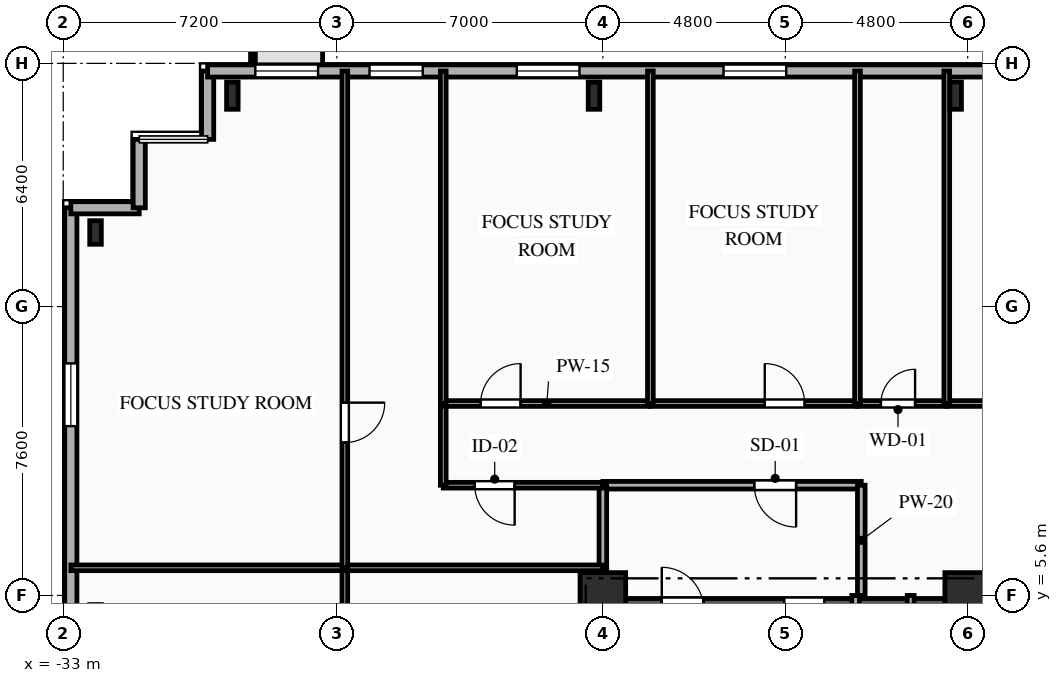
"""IFC4 building model, lengths in metres.
Left out: names, types, materials, properties, quantities, classifications, styles, units other than length and angle.
Written with IfcOpenShell. Run it as: python <this file> out.ifc"""

import sys

from ifc_helpers import new_model, si_unit, direction, frame, frame_2d, origin, origin_2d, place, context, subcontext, project, spatial, rectangle, i_section, extrude, element, fill, save


model = new_model("IFC4")
c1 = context("Model", 3, precision=1e-05, world=origin(), true_north=direction((0.0, 1.0)))
c2 = subcontext(c1, "Body", "Model", "MODEL_VIEW")
j1 = project(units=[si_unit("LENGTHUNIT", "METRE"), si_unit("PLANEANGLEUNIT", "RADIAN")], contexts=[c1])
p1 = place(None, origin())
s1 = spatial("IfcSite", under=j1, at=p1, CompositionType="ELEMENT")
p2 = place(p1, origin())
s2 = spatial("IfcBuilding", under=s1, at=p2, CompositionType="ELEMENT")
p3 = place(p2, frame((0.0, 0.0, 70.55)))
s3 = spatial("IfcBuildingStorey", under=s2, at=p3, CompositionType="ELEMENT", Elevation=70.55)
for number, where, z_axis, x_axis in (
    (1, (-18.8, 5.6, 0.0), (0.0, 0.0, 1.0), (1.0, 0.0, 0.0)),
    (2, (-9.2, 5.6, 0.0), (0.0, 0.0, 1.0), (1.0, 0.0, 0.0)),
):
    element("IfcColumn", number, at=place(p3, frame(where, z_axis=z_axis, x_axis=x_axis)), inside=s3, PredefinedType="COLUMN", context=c2, shape_type="SweptSolid", body=[
        extrude(rectangle(XDim=1.2, YDim=1.2, at=origin_2d()), origin(), (0.0, 0.0, 1.0), 3.35),
    ])
for number, where, z_axis, x_axis in (
    (3, (-9.517, 18.75, 0.0), (0.0, 0.0, 1.0), (1.0, 0.0, 0.0)),
    (4, (-19.033, 18.75, 0.0), (0.0, 0.0, 1.0), (1.0, 0.0, 0.0)),
    (5, (-28.55, 18.75, 0.0), (0.0, 0.0, 1.0), (1.0, 0.0, 0.0)),
):
    element("IfcColumn", number, at=place(p3, frame(where, z_axis=z_axis, x_axis=x_axis)), inside=s3, PredefinedType="COLUMN", context=c2, shape_type="SweptSolid", body=[
        extrude(i_section(OverallWidth=0.304, OverallDepth=0.716, WebThickness=0.021, FlangeThickness=0.04, FilletRadius=0.027, at=origin_2d()), origin(), (0.0, 0.0, 1.0), 3.35),
    ])
p4 = place(p3, frame((-32.15, 15.15, 0.0), z_axis=(0.0, 0.0, 1.0), x_axis=(1.0, 0.0, 0.0)))
e6 = element("IfcColumn", 6, at=p4, inside=s3, PredefinedType="COLUMN", context=c2, shape_type="SweptSolid", body=[
    extrude(i_section(OverallWidth=0.305, OverallDepth=0.62, WebThickness=0.021, FlangeThickness=0.04, FilletRadius=0.027, at=origin_2d()), origin(), (0.0, 0.0, 1.0), 3.35),
])
p5 = place(p3, frame((-32.8, -15.8, 0.0), z_axis=(0.0, 0.0, 1.0), x_axis=(0.0, 1.0, 0.0)))
e7 = element("IfcWall", 7, at=p5, inside=s3, PredefinedType="SOLIDWALL", context=c2, shape_type="SweptSolid", body=[
    extrude(rectangle(XDim=31.6, YDim=0.32, at=frame_2d((15.8, 0.0))), origin(), (0.0, 0.0, 1.0), 3.0),
])
p6 = place(p5, frame((4.175, 0.0, 0.85)))
e8 = element("IfcOpeningElement", 8, at=p6, cuts=e7, PredefinedType="OPENING", context=c2, shape_type="SweptSolid", body=[
    extrude(rectangle(XDim=1.65, YDim=1.85, at=frame_2d((0.825, 0.925))), frame((0.0, 0.17, 0.0), z_axis=(0.0, -1.0, 0.0), x_axis=(1.0, 0.0, 0.0)), (0.0, 0.0, 1.0), 0.34),
])
p7 = place(p5, frame((15.015, 0.0, 0.85)))
e9 = element("IfcOpeningElement", 9, at=p7, cuts=e7, PredefinedType="OPENING", context=c2, shape_type="SweptSolid", body=[
    extrude(rectangle(XDim=1.65, YDim=1.85, at=frame_2d((0.825, 0.925))), frame((0.0, 0.17, 0.0), z_axis=(0.0, -1.0, 0.0), x_axis=(1.0, 0.0, 0.0)), (0.0, 0.0, 1.0), 0.34),
])
p8 = place(p5, frame((25.855, 0.0, 0.85)))
e10 = element("IfcOpeningElement", 10, at=p8, cuts=e7, PredefinedType="OPENING", context=c2, shape_type="SweptSolid", body=[
    extrude(rectangle(XDim=1.65, YDim=1.85, at=frame_2d((0.825, 0.925))), frame((0.0, 0.17, 0.0), z_axis=(0.0, -1.0, 0.0), x_axis=(1.0, 0.0, 0.0)), (0.0, 0.0, 1.0), 0.34),
])
for number, where, z_axis, x_axis in (
    (11, (-32.8, 15.8, 0.0), (0.0, 0.0, 1.0), (1.0, 0.0, 0.0)),
    (12, (-31.0, 15.8, 0.0), (0.0, 0.0, 1.0), (0.0, 1.0, 0.0)),
):
    element("IfcWall", number, at=place(p3, frame(where, z_axis=z_axis, x_axis=x_axis)), inside=s3, PredefinedType="SOLIDWALL", context=c2, shape_type="SweptSolid", body=[
        extrude(rectangle(XDim=1.8, YDim=0.32, at=frame_2d((0.9, 0.0))), origin(), (0.0, 0.0, 1.0), 3.0),
    ])
p9 = place(p3, frame((-29.2, 17.6, 0.0), z_axis=(0.0, 0.0, 1.0), x_axis=(0.0, 1.0, 0.0)))
e13 = element("IfcWall", 13, at=p9, inside=s3, PredefinedType="SOLIDWALL", context=c2, shape_type="SweptSolid", body=[
    extrude(rectangle(XDim=1.8, YDim=0.32, at=frame_2d((0.9, 0.0))), origin(), (0.0, 0.0, 1.0), 3.0),
])
p10 = place(p3, frame((-29.2, 19.4, 0.0), z_axis=(0.0, 0.0, 1.0), x_axis=(1.0, 0.0, 0.0)))
e14 = element("IfcWall", 14, at=p10, inside=s3, PredefinedType="SOLIDWALL", context=c2, shape_type="SweptSolid", body=[
    extrude(rectangle(XDim=58.4, YDim=0.32, at=frame_2d((29.2, 0.0))), origin(), (0.0, 0.0, 1.0), 3.0),
])
p11 = place(p10, frame((1.255, 0.0, 0.85)))
e15 = element("IfcOpeningElement", 15, at=p11, cuts=e14, PredefinedType="OPENING", context=c2, shape_type="SweptSolid", body=[
    extrude(rectangle(XDim=1.65, YDim=1.85, at=frame_2d((0.825, 0.925))), frame((0.0, 0.17, 0.0), z_axis=(0.0, -1.0, 0.0), x_axis=(1.0, 0.0, 0.0)), (0.0, 0.0, 1.0), 0.34),
])
p12 = place(p10, frame((4.26, 0.0, 0.85)))
e16 = element("IfcOpeningElement", 16, at=p12, cuts=e14, PredefinedType="OPENING", context=c2, shape_type="SweptSolid", body=[
    extrude(rectangle(XDim=1.4, YDim=1.85, at=frame_2d((0.7, 0.925))), frame((0.0, 0.17, 0.0), z_axis=(0.0, -1.0, 0.0), x_axis=(1.0, 0.0, 0.0)), (0.0, 0.0, 1.0), 0.34),
])
p13 = place(p10, frame((8.135, 0.0, 0.85)))
e17 = element("IfcOpeningElement", 17, at=p13, cuts=e14, PredefinedType="OPENING", context=c2, shape_type="SweptSolid", body=[
    extrude(rectangle(XDim=1.65, YDim=1.85, at=frame_2d((0.825, 0.925))), frame((0.0, 0.17, 0.0), z_axis=(0.0, -1.0, 0.0), x_axis=(1.0, 0.0, 0.0)), (0.0, 0.0, 1.0), 0.34),
])
p14 = place(p10, frame((13.575, 0.0, 0.85)))
e18 = element("IfcOpeningElement", 18, at=p14, cuts=e14, PredefinedType="OPENING", context=c2, shape_type="SweptSolid", body=[
    extrude(rectangle(XDim=1.65, YDim=1.85, at=frame_2d((0.825, 0.925))), frame((0.0, 0.17, 0.0), z_axis=(0.0, -1.0, 0.0), x_axis=(1.0, 0.0, 0.0)), (0.0, 0.0, 1.0), 0.34),
])
p15 = place(p10, frame((23.28, 0.0, 0.85)))
e19 = element("IfcOpeningElement", 19, at=p15, cuts=e14, PredefinedType="OPENING", context=c2, shape_type="SweptSolid", body=[
    extrude(rectangle(XDim=1.6, YDim=1.85, at=frame_2d((0.8, 0.925))), frame((0.0, 0.17, 0.0), z_axis=(0.0, -1.0, 0.0), x_axis=(1.0, 0.0, 0.0)), (0.0, 0.0, 1.0), 0.34),
])
p16 = place(p10, frame((33.3, 0.0, 0.85)))
e20 = element("IfcOpeningElement", 20, at=p16, cuts=e14, PredefinedType="OPENING", context=c2, shape_type="SweptSolid", body=[
    extrude(rectangle(XDim=2.2, YDim=1.85, at=frame_2d((1.1, 0.925))), frame((0.0, 0.17, 0.0), z_axis=(0.0, -1.0, 0.0), x_axis=(1.0, 0.0, 0.0)), (0.0, 0.0, 1.0), 0.34),
])
p17 = place(p10, frame((42.335, 0.0, 0.85)))
e21 = element("IfcOpeningElement", 21, at=p17, cuts=e14, PredefinedType="OPENING", context=c2, shape_type="SweptSolid", body=[
    extrude(rectangle(XDim=1.65, YDim=1.85, at=frame_2d((0.825, 0.925))), frame((0.0, 0.17, 0.0), z_axis=(0.0, -1.0, 0.0), x_axis=(1.0, 0.0, 0.0)), (0.0, 0.0, 1.0), 0.34),
])
p18 = place(p10, frame((48.905, 0.0, 0.85)))
e22 = element("IfcOpeningElement", 22, at=p18, cuts=e14, PredefinedType="OPENING", context=c2, shape_type="SweptSolid", body=[
    extrude(rectangle(XDim=1.65, YDim=1.85, at=frame_2d((0.825, 0.925))), frame((0.0, 0.17, 0.0), z_axis=(0.0, -1.0, 0.0), x_axis=(1.0, 0.0, 0.0)), (0.0, 0.0, 1.0), 0.34),
])
p19 = place(p10, frame((54.32, 0.0, 0.85)))
e23 = element("IfcOpeningElement", 23, at=p19, cuts=e14, PredefinedType="OPENING", context=c2, shape_type="SweptSolid", body=[
    extrude(rectangle(XDim=1.6, YDim=1.85, at=frame_2d((0.8, 0.925))), frame((0.0, 0.17, 0.0), z_axis=(0.0, -1.0, 0.0), x_axis=(1.0, 0.0, 0.0)), (0.0, 0.0, 1.0), 0.34),
])
p20 = place(p3, frame((-18.8, 5.24, 0.0), z_axis=(0.0, 0.0, 1.0), x_axis=(1.0, 0.0, 0.0)))
e24 = element("IfcWall", 24, at=p20, inside=s3, PredefinedType="SHEAR", context=c2, shape_type="SweptSolid", body=[
    extrude(rectangle(XDim=9.6, YDim=0.56, at=frame_2d((4.8, 0.0))), origin(), (0.0, 0.0, 1.0), 3.0),
])
p21 = place(p20, frame((1.55, 0.0, 0.0)))
e25 = element("IfcOpeningElement", 25, at=p21, cuts=e24, PredefinedType="OPENING", context=c2, shape_type="SweptSolid", body=[
    extrude(rectangle(XDim=1.1, YDim=2.15, at=frame_2d((0.55, 1.075))), frame((0.0, 0.29, 0.0), z_axis=(0.0, -1.0, 0.0), x_axis=(1.0, 0.0, 0.0)), (0.0, 0.0, 1.0), 0.58),
])
p22 = place(p20, frame((4.775, 0.0, 0.0)))
e26 = element("IfcOpeningElement", 26, at=p22, cuts=e24, PredefinedType="OPENING", context=c2, shape_type="SweptSolid", body=[
    extrude(rectangle(XDim=1.05, YDim=2.1, at=frame_2d((0.525, 1.05))), frame((0.0, 0.29, 0.0), z_axis=(0.0, -1.0, 0.0), x_axis=(1.0, 0.0, 0.0)), (0.0, 0.0, 1.0), 0.58),
])
p23 = place(p3, frame((-12.15, 1.55, 0.0), z_axis=(0.0, 0.0, 1.0), x_axis=(0.0, 1.0, 0.0)))
e27 = element("IfcWall", 27, at=p23, inside=s3, PredefinedType="PARTITIONING", context=c2, shape_type="SweptSolid", body=[
    extrude(rectangle(XDim=4.05, YDim=0.2, at=frame_2d((2.025, 0.0))), origin(), (0.0, 0.0, 1.0), 3.0),
])
p24 = place(p3, frame((-12.0, 8.5, 0.0), z_axis=(0.0, 0.0, 1.0), x_axis=(-1.0, 0.0, 0.0)))
e28 = element("IfcWall", 28, at=p24, inside=s3, PredefinedType="PARTITIONING", context=c2, shape_type="SweptSolid", body=[
    extrude(rectangle(XDim=6.8, YDim=0.2, at=frame_2d((3.4, 0.0))), origin(), (0.0, 0.0, 1.0), 3.0),
])
p25 = place(p24, frame((1.715, 0.0, 0.0)))
e29 = element("IfcOpeningElement", 29, at=p25, cuts=e28, PredefinedType="OPENING", context=c2, shape_type="SweptSolid", body=[
    extrude(rectangle(XDim=1.1, YDim=2.15, at=frame_2d((0.55, 1.075))), frame((0.0, 0.11, 0.0), z_axis=(0.0, -1.0, 0.0), x_axis=(1.0, 0.0, 0.0)), (0.0, 0.0, 1.0), 0.22),
])
p26 = place(p3, frame((-12.0, 5.6, 0.0), z_axis=(0.0, 0.0, 1.0), x_axis=(0.0, 1.0, 0.0)))
e30 = element("IfcWall", 30, at=p26, inside=s3, PredefinedType="PARTITIONING", context=c2, shape_type="SweptSolid", body=[
    extrude(rectangle(XDim=2.9, YDim=0.2, at=frame_2d((1.45, 0.0))), origin(), (0.0, 0.0, 1.0), 3.0),
])
p27 = place(p3, frame((-18.8, 6.327, 0.0), z_axis=(0.0, 0.0, 1.0), x_axis=(0.0, -1.0, 0.0)))
e31 = element("IfcWall", 31, at=p27, inside=s3, PredefinedType="PARTITIONING", context=c2, shape_type="SweptSolid", body=[
    extrude(rectangle(XDim=0.727, YDim=0.2, at=frame_2d((0.363, 0.0))), origin(), (0.0, 0.0, 1.0), 2.485),
])
p28 = place(p3, frame((-18.8, 8.5, 0.0), z_axis=(0.0, 0.0, 1.0), x_axis=(0.0, -1.0, 0.0)))
e32 = element("IfcWall", 32, at=p28, inside=s3, PredefinedType="PARTITIONING", context=c2, shape_type="SweptSolid", body=[
    extrude(rectangle(XDim=2.173, YDim=0.2, at=frame_2d((1.086, 0.0))), origin(), (0.0, 0.0, 1.0), 2.485),
])
p29 = place(p3, frame((-10.7, 5.6, 0.0), z_axis=(0.0, 0.0, 1.0), x_axis=(0.0, -1.0, 0.0)))
e33 = element("IfcWall", 33, at=p29, inside=s3, PredefinedType="PARTITIONING", context=c2, shape_type="SweptSolid", body=[
    extrude(rectangle(XDim=4.05, YDim=0.18, at=frame_2d((2.025, 0.0))), origin(), (0.0, 0.0, 1.0), 3.0),
])
p30 = place(p29, frame((1.325, 0.0, 0.0)))
e34 = element("IfcOpeningElement", 34, at=p30, cuts=e33, PredefinedType="OPENING", context=c2, shape_type="SweptSolid", body=[
    extrude(rectangle(XDim=1.25, YDim=2.2, at=frame_2d((0.625, 1.1))), frame((0.0, 0.1, 0.0), z_axis=(0.0, -1.0, 0.0), x_axis=(1.0, 0.0, 0.0)), (0.0, 0.0, 1.0), 0.2),
])
p31 = place(p3, frame((-18.8, 8.5, 0.0), z_axis=(0.0, 0.0, 1.0), x_axis=(-1.0, 0.0, 0.0)))
e35 = element("IfcWall", 35, at=p31, inside=s3, PredefinedType="PARTITIONING", context=c2, shape_type="SweptSolid", body=[
    extrude(rectangle(XDim=4.2, YDim=0.15, at=frame_2d((2.1, 0.0))), origin(), (0.0, 0.0, 1.0), 3.0),
])
p32 = place(p31, frame((2.321, 0.0, 0.0)))
e36 = element("IfcOpeningElement", 36, at=p32, cuts=e35, PredefinedType="OPENING", context=c2, shape_type="SweptSolid", body=[
    extrude(rectangle(XDim=1.05, YDim=2.15, at=frame_2d((0.525, 1.075))), frame((0.0, 0.085, 0.0), z_axis=(0.0, -1.0, 0.0), x_axis=(1.0, 0.0, 0.0)), (0.0, 0.0, 1.0), 0.17),
])
p33 = place(p3, frame((-23.0, 8.5, 0.0), z_axis=(0.0, 0.0, 1.0), x_axis=(0.0, 1.0, 0.0)))
e37 = element("IfcWall", 37, at=p33, inside=s3, PredefinedType="PARTITIONING", context=c2, shape_type="SweptSolid", body=[
    extrude(rectangle(XDim=2.15, YDim=0.15, at=frame_2d((1.075, 0.0))), origin(), (0.0, 0.0, 1.0), 3.0),
])
p34 = place(p3, frame((-23.0, 10.65, 0.0), z_axis=(0.0, 0.0, 1.0), x_axis=(1.0, 0.0, 0.0)))
e38 = element("IfcWall", 38, at=p34, inside=s3, PredefinedType="PARTITIONING", context=c2, shape_type="SweptSolid", body=[
    extrude(rectangle(XDim=5.45, YDim=0.15, at=frame_2d((2.725, 0.0))), origin(), (0.0, 0.0, 1.0), 3.0),
])
p35 = place(p34, frame((0.985, 0.0, 0.0)))
e39 = element("IfcOpeningElement", 39, at=p35, cuts=e38, PredefinedType="OPENING", context=c2, shape_type="SweptSolid", body=[
    extrude(rectangle(XDim=1.05, YDim=2.15, at=frame_2d((0.525, 1.075))), frame((0.0, 0.085, 0.0), z_axis=(0.0, -1.0, 0.0), x_axis=(1.0, 0.0, 0.0)), (0.0, 0.0, 1.0), 0.17),
])
p36 = place(p3, frame((-17.55, 10.65, 0.0), z_axis=(0.0, 0.0, 1.0), x_axis=(1.0, 0.0, 0.0)))
e40 = element("IfcWall", 40, at=p36, inside=s3, PredefinedType="PARTITIONING", context=c2, shape_type="SweptSolid", body=[
    extrude(rectangle(XDim=5.45, YDim=0.15, at=frame_2d((2.725, 0.0))), origin(), (0.0, 0.0, 1.0), 3.0),
])
p37 = place(p36, frame((3.01, 0.0, 0.0)))
e41 = element("IfcOpeningElement", 41, at=p37, cuts=e40, PredefinedType="OPENING", context=c2, shape_type="SweptSolid", body=[
    extrude(rectangle(XDim=1.05, YDim=2.15, at=frame_2d((0.525, 1.075))), frame((0.0, 0.085, 0.0), z_axis=(0.0, -1.0, 0.0), x_axis=(1.0, 0.0, 0.0)), (0.0, 0.0, 1.0), 0.17),
])
p38 = place(p3, frame((-12.1, 10.65, 0.0), z_axis=(0.0, 0.0, 1.0), x_axis=(1.0, 0.0, 0.0)))
e42 = element("IfcWall", 42, at=p38, inside=s3, PredefinedType="PLUMBINGWALL", context=c2, shape_type="SweptSolid", body=[
    extrude(rectangle(XDim=2.35, YDim=0.15, at=frame_2d((1.175, 0.0))), origin(), (0.0, 0.0, 1.0), 3.0),
])
p39 = place(p38, frame((0.616, 0.0, 0.0)))
e43 = element("IfcOpeningElement", 43, at=p39, cuts=e42, PredefinedType="OPENING", context=c2, shape_type="SweptSolid", body=[
    extrude(rectangle(XDim=0.9, YDim=2.1, at=frame_2d((0.45, 1.05))), frame((0.0, 0.085, 0.0), z_axis=(0.0, -1.0, 0.0), x_axis=(1.0, 0.0, 0.0)), (0.0, 0.0, 1.0), 0.17),
])
p40 = place(p3, frame((-9.75, 10.65, 0.0), z_axis=(0.0, 0.0, 1.0), x_axis=(1.0, 0.0, 0.0)))
e44 = element("IfcWall", 44, at=p40, inside=s3, PredefinedType="PARTITIONING", context=c2, shape_type="SweptSolid", body=[
    extrude(rectangle(XDim=9.15, YDim=0.15, at=frame_2d((4.575, 0.0))), origin(), (0.0, 0.0, 1.0), 3.0),
])
p41 = place(p40, frame((6.74, 0.0, 0.0)))
e45 = element("IfcOpeningElement", 45, at=p41, cuts=e44, PredefinedType="OPENING", context=c2, shape_type="SweptSolid", body=[
    extrude(rectangle(XDim=0.95, YDim=2.1, at=frame_2d((0.475, 1.05))), frame((0.0, 0.085, 0.0), z_axis=(0.0, -1.0, 0.0), x_axis=(1.0, 0.0, 0.0)), (0.0, 0.0, 1.0), 0.17),
])
p42 = place(p3, frame((-25.59, 6.327, 0.0), z_axis=(0.0, 0.0, 1.0), x_axis=(0.0, -1.0, 0.0)))
e46 = element("IfcWall", 46, at=p42, inside=s3, PredefinedType="PARTITIONING", context=c2, shape_type="SweptSolid", body=[
    extrude(rectangle(XDim=12.654, YDim=0.15, at=frame_2d((6.327, 0.0))), origin(), (0.0, 0.0, 1.0), 2.655),
])
p43 = place(p42, frame((5.802, 0.0, 0.0)))
e47 = element("IfcOpeningElement", 47, at=p43, cuts=e46, PredefinedType="OPENING", context=c2, shape_type="SweptSolid", body=[
    extrude(rectangle(XDim=1.05, YDim=2.15, at=frame_2d((0.525, 1.075))), frame((0.0, 0.085, 0.0), z_axis=(0.0, -1.0, 0.0), x_axis=(1.0, 0.0, 0.0)), (0.0, 0.0, 1.0), 0.17),
])
p44 = place(p3, frame((-32.8, 6.327, 0.0), z_axis=(0.0, 0.0, 1.0), x_axis=(1.0, 0.0, 0.0)))
e48 = element("IfcWall", 48, at=p44, inside=s3, PredefinedType="PARTITIONING", context=c2, shape_type="SweptSolid", body=[
    extrude(rectangle(XDim=7.21, YDim=0.15, at=frame_2d((3.605, 0.0))), origin(), (0.0, 0.0, 1.0), 3.0),
])
p45 = place(p3, frame((-25.59, 6.327, 0.0), z_axis=(0.0, 0.0, 1.0), x_axis=(1.0, 0.0, 0.0)))
e49 = element("IfcWall", 49, at=p45, inside=s3, PredefinedType="PARTITIONING", context=c2, shape_type="SweptSolid", body=[
    extrude(rectangle(XDim=6.79, YDim=0.15, at=frame_2d((3.395, 0.0))), origin(), (0.0, 0.0, 1.0), 3.0),
])
p46 = place(p3, frame((-25.59, 19.4, 0.0), z_axis=(0.0, 0.0, 1.0), x_axis=(0.0, -1.0, 0.0)))
e50 = element("IfcWall", 50, at=p46, inside=s3, PredefinedType="PARTITIONING", context=c2, shape_type="SweptSolid", body=[
    extrude(rectangle(XDim=13.073, YDim=0.15, at=frame_2d((6.537, 0.0))), origin(), (0.0, 0.0, 1.0), 2.655),
])
p47 = place(p46, frame((8.727, 0.0, 0.0)))
e51 = element("IfcOpeningElement", 51, at=p47, cuts=e50, PredefinedType="OPENING", context=c2, shape_type="SweptSolid", body=[
    extrude(rectangle(XDim=1.05, YDim=2.15, at=frame_2d((0.525, 1.075))), frame((0.0, 0.085, 0.0), z_axis=(0.0, -1.0, 0.0), x_axis=(1.0, 0.0, 0.0)), (0.0, 0.0, 1.0), 0.17),
])
for number, where, z_axis, x_axis in (
    (52, (-23.0, 19.4, 0.0), (0.0, 0.0, 1.0), (0.0, -1.0, 0.0)),
    (53, (-17.55, 19.4, 0.0), (0.0, 0.0, 1.0), (0.0, -1.0, 0.0)),
):
    element("IfcWall", number, at=place(p3, frame(where, z_axis=z_axis, x_axis=x_axis)), inside=s3, PredefinedType="PARTITIONING", context=c2, shape_type="SweptSolid", body=[
        extrude(rectangle(XDim=8.75, YDim=0.15, at=frame_2d((4.375, 0.0))), origin(), (0.0, 0.0, 1.0), 3.0),
    ])
for number, where, z_axis, x_axis in (
    (54, (-12.1, 19.4, 0.0), (0.0, 0.0, 1.0), (0.0, -1.0, 0.0)),
    (55, (-9.75, 19.4, 0.0), (0.0, 0.0, 1.0), (0.0, -1.0, 0.0)),
):
    element("IfcWall", number, at=place(p3, frame(where, z_axis=z_axis, x_axis=x_axis)), inside=s3, PredefinedType="PLUMBINGWALL", context=c2, shape_type="SweptSolid", body=[
        extrude(rectangle(XDim=8.75, YDim=0.15, at=frame_2d((4.375, 0.0))), origin(), (0.0, 0.0, 1.0), 3.0),
    ])
p48 = place(p8, origin())
e56 = element("IfcWindow", 56, at=p48, inside=s3, PartitioningType="SINGLE_PANEL", PredefinedType="WINDOW", context=c2, shape_type="SweptSolid", body=[
    extrude(rectangle(XDim=1.65, YDim=1.85, at=frame_2d((0.825, 0.925))), frame((0.0, 0.03, 0.0), z_axis=(0.0, -1.0, 0.0), x_axis=(1.0, 0.0, 0.0)), (0.0, 0.0, 1.0), 0.06),
])
fill(e10, e56)
p49 = place(p11, origin())
e57 = element("IfcWindow", 57, at=p49, inside=s3, PartitioningType="SINGLE_PANEL", PredefinedType="WINDOW", context=c2, shape_type="SweptSolid", body=[
    extrude(rectangle(XDim=1.65, YDim=1.85, at=frame_2d((0.825, 0.925))), frame((0.0, 0.03, 0.0), z_axis=(0.0, -1.0, 0.0), x_axis=(1.0, 0.0, 0.0)), (0.0, 0.0, 1.0), 0.06),
])
fill(e15, e57)
p50 = place(p12, origin())
e58 = element("IfcWindow", 58, at=p50, inside=s3, PartitioningType="SINGLE_PANEL", PredefinedType="WINDOW", context=c2, shape_type="SweptSolid", body=[
    extrude(rectangle(XDim=1.4, YDim=1.85, at=frame_2d((0.7, 0.925))), frame((0.0, 0.03, 0.0), z_axis=(0.0, -1.0, 0.0), x_axis=(1.0, 0.0, 0.0)), (0.0, 0.0, 1.0), 0.06),
])
fill(e16, e58)
p51 = place(p13, origin())
e59 = element("IfcWindow", 59, at=p51, inside=s3, PartitioningType="SINGLE_PANEL", PredefinedType="WINDOW", context=c2, shape_type="SweptSolid", body=[
    extrude(rectangle(XDim=1.65, YDim=1.85, at=frame_2d((0.825, 0.925))), frame((0.0, 0.03, 0.0), z_axis=(0.0, -1.0, 0.0), x_axis=(1.0, 0.0, 0.0)), (0.0, 0.0, 1.0), 0.06),
])
fill(e17, e59)
p52 = place(p14, origin())
e60 = element("IfcWindow", 60, at=p52, inside=s3, PartitioningType="SINGLE_PANEL", PredefinedType="WINDOW", context=c2, shape_type="SweptSolid", body=[
    extrude(rectangle(XDim=1.65, YDim=1.85, at=frame_2d((0.825, 0.925))), frame((0.0, 0.03, 0.0), z_axis=(0.0, -1.0, 0.0), x_axis=(1.0, 0.0, 0.0)), (0.0, 0.0, 1.0), 0.06),
])
fill(e18, e60)
p53 = place(p25, origin())
e61 = element("IfcDoor", 61, at=p53, inside=s3, OperationType="SINGLE_SWING_LEFT", PredefinedType="DOOR", context=c2, shape_type="SweptSolid", body=[
    extrude(rectangle(XDim=1.1, YDim=2.15, at=frame_2d((0.55, 1.075))), frame((0.0, 0.025, 0.0), z_axis=(0.0, -1.0, 0.0), x_axis=(1.0, 0.0, 0.0)), (0.0, 0.0, 1.0), 0.05),
])
fill(e29, e61)
p54 = place(p32, origin())
e62 = element("IfcDoor", 62, at=p54, inside=s3, OperationType="SINGLE_SWING_LEFT", PredefinedType="DOOR", context=c2, shape_type="SweptSolid", body=[
    extrude(rectangle(XDim=1.05, YDim=2.15, at=frame_2d((0.525, 1.075))), frame((0.0, 0.025, 0.0), z_axis=(0.0, -1.0, 0.0), x_axis=(1.0, 0.0, 0.0)), (0.0, 0.0, 1.0), 0.05),
])
fill(e36, e62)
p55 = place(p35, origin())
e63 = element("IfcDoor", 63, at=p55, inside=s3, OperationType="SINGLE_SWING_RIGHT", PredefinedType="DOOR", context=c2, shape_type="SweptSolid", body=[
    extrude(rectangle(XDim=1.05, YDim=2.15, at=frame_2d((0.525, 1.075))), frame((0.0, 0.025, 0.0), z_axis=(0.0, -1.0, 0.0), x_axis=(1.0, 0.0, 0.0)), (0.0, 0.0, 1.0), 0.05),
])
fill(e39, e63)
p56 = place(p37, origin())
e64 = element("IfcDoor", 64, at=p56, inside=s3, OperationType="SINGLE_SWING_LEFT", PredefinedType="DOOR", context=c2, shape_type="SweptSolid", body=[
    extrude(rectangle(XDim=1.05, YDim=2.15, at=frame_2d((0.525, 1.075))), frame((0.0, 0.025, 0.0), z_axis=(0.0, -1.0, 0.0), x_axis=(1.0, 0.0, 0.0)), (0.0, 0.0, 1.0), 0.05),
])
fill(e41, e64)
p57 = place(p39, origin())
e65 = element("IfcDoor", 65, at=p57, inside=s3, OperationType="SINGLE_SWING_RIGHT", PredefinedType="DOOR", context=c2, shape_type="SweptSolid", body=[
    extrude(rectangle(XDim=0.9, YDim=2.1, at=frame_2d((0.45, 1.05))), frame((0.0, 0.025, 0.0), z_axis=(0.0, -1.0, 0.0), x_axis=(1.0, 0.0, 0.0)), (0.0, 0.0, 1.0), 0.05),
])
fill(e43, e65)
p58 = place(p47, origin())
e66 = element("IfcDoor", 66, at=p58, inside=s3, OperationType="SINGLE_SWING_LEFT", PredefinedType="DOOR", context=c2, shape_type="SweptSolid", body=[
    extrude(rectangle(XDim=1.05, YDim=2.15, at=frame_2d((0.525, 1.075))), frame((0.0, 0.025, 0.0), z_axis=(0.0, -1.0, 0.0), x_axis=(1.0, 0.0, 0.0)), (0.0, 0.0, 1.0), 0.05),
])
fill(e51, e66)
save(model, sys.argv[1])
